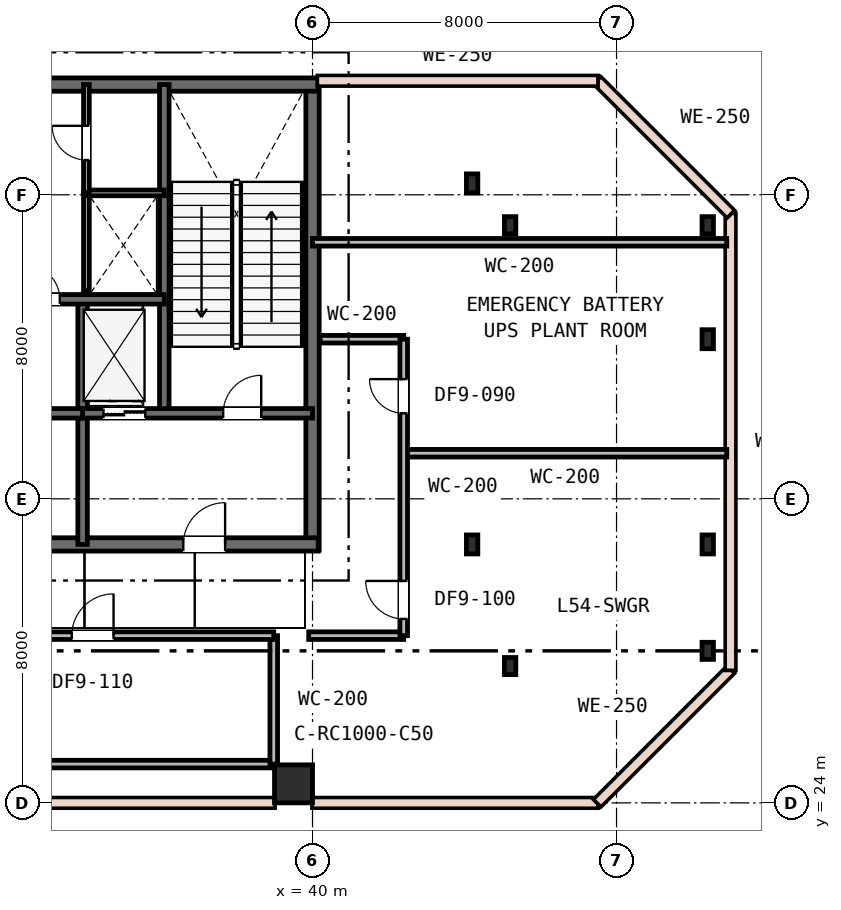
"""IFC4 building model, lengths in metres.
Left out: names, types, materials, properties, quantities, classifications, styles, units other than length and angle.
Written with IfcOpenShell. Run it as: python <this file> out.ifc"""

import sys

from ifc_helpers import new_model, si_unit, direction, frame, frame_2d, origin, origin_2d, place, context, subcontext, project, spatial, rectangle, i_section, extrude, element, fill, save


model = new_model("IFC4")
c1 = context("Model", 3, precision=1e-05, world=origin(), true_north=direction((0.0, 1.0)))
c2 = subcontext(c1, "Body", "Model", "MODEL_VIEW")
j1 = project(units=[si_unit("LENGTHUNIT", "METRE"), si_unit("PLANEANGLEUNIT", "RADIAN")], contexts=[c1])
p1 = place(None, origin())
s1 = spatial("IfcSite", under=j1, at=p1, CompositionType="ELEMENT")
p2 = place(p1, origin())
s2 = spatial("IfcBuilding", under=s1, at=p2, CompositionType="ELEMENT")
p3 = place(p2, frame((0.0, 0.0, 208.2)))
s3 = spatial("IfcBuildingStorey", under=s2, at=p3, CompositionType="ELEMENT", Elevation=208.2)
p4 = place(p3, frame((40.0, 30.65, 0.0), z_axis=(0.0, 0.0, 1.0), x_axis=(0.0, 1.0, 0.0)))
e1 = element("IfcWall", 1, at=p4, inside=s3, PredefinedType="SHEAR", context=c2, shape_type="SweptSolid", body=[
    extrude(rectangle(XDim=12.3, YDim=0.35, at=frame_2d((6.15, 0.0))), origin(), (0.0, 0.0, 1.0), 4.8),
])
p5 = place(p3, frame((15.85, 42.9, 0.0), z_axis=(0.0, 0.0, 1.0), x_axis=(1.0, 0.0, 0.0)))
e2 = element("IfcWall", 2, at=p5, inside=s3, PredefinedType="SHEAR", context=c2, shape_type="SweptSolid", body=[
    extrude(rectangle(XDim=24.3, YDim=0.35, at=frame_2d((12.15, 0.0))), origin(), (0.0, 0.0, 1.0), 4.8),
])
p6 = place(p3, frame((28.95, 30.8, 0.0), z_axis=(0.0, 0.0, 1.0), x_axis=(1.0, 0.0, 0.0)))
e3 = element("IfcWall", 3, at=p6, inside=s3, PredefinedType="SHEAR", context=c2, shape_type="SweptSolid", body=[
    extrude(rectangle(XDim=11.2, YDim=0.35, at=frame_2d((5.6, 0.0))), origin(), (0.0, 0.0, 1.0), 4.8),
])
p7 = place(p6, frame((7.65, 0.0, 0.0)))
e4 = element("IfcOpeningElement", 4, at=p7, cuts=e3, PredefinedType="OPENING", context=c2, shape_type="SweptSolid", body=[
    extrude(rectangle(XDim=1.1, YDim=2.15, at=frame_2d((0.55, 1.075))), frame((0.0, 0.185, 0.0), z_axis=(0.0, -1.0, 0.0), x_axis=(1.0, 0.0, 0.0)), (0.0, 0.0, 1.0), 0.37),
])
p8 = place(p3, frame((36.1, 34.25, 0.0), z_axis=(0.0, 0.0, 1.0), x_axis=(0.0, 1.0, 0.0)))
e5 = element("IfcWall", 5, at=p8, inside=s3, PredefinedType="SHEAR", context=c2, shape_type="SweptSolid", body=[
    extrude(rectangle(XDim=8.65, YDim=0.25, at=frame_2d((4.325, 0.0))), origin(), (0.0, 0.0, 1.0), 4.8),
])
p9 = place(p3, frame((33.95, 30.8, 0.0), z_axis=(0.0, 0.0, 1.0), x_axis=(0.0, 1.0, 0.0)))
e6 = element("IfcWall", 6, at=p9, inside=s3, PredefinedType="SHEAR", context=c2, shape_type="SweptSolid", body=[
    extrude(rectangle(XDim=6.45, YDim=0.25, at=frame_2d((3.225, 0.0))), origin(), (0.0, 0.0, 1.0), 4.8),
])
p10 = place(p3, frame((33.95, 34.25, 0.0), z_axis=(0.0, 0.0, 1.0), x_axis=(1.0, 0.0, 0.0)))
e7 = element("IfcWall", 7, at=p10, inside=s3, PredefinedType="SHEAR", context=c2, shape_type="SweptSolid", body=[
    extrude(rectangle(XDim=6.05, YDim=0.25, at=frame_2d((3.025, 0.0))), origin(), (0.0, 0.0, 1.0), 4.8),
])
p11 = place(p10, frame((3.7, 0.0, 0.0)))
e8 = element("IfcOpeningElement", 8, at=p11, cuts=e7, PredefinedType="OPENING", context=c2, shape_type="SweptSolid", body=[
    extrude(rectangle(XDim=1.0, YDim=2.15, at=frame_2d((0.5, 1.075))), frame((0.0, 0.135, 0.0), z_axis=(0.0, -1.0, 0.0), x_axis=(1.0, 0.0, 0.0)), (0.0, 0.0, 1.0), 0.27),
])
p12 = place(p10, frame((0.55, 0.0, 0.0)))
e9 = element("IfcOpeningElement", 9, at=p12, cuts=e7, PredefinedType="OPENING", context=c2, shape_type="SweptSolid", body=[
    extrude(rectangle(XDim=1.1, YDim=2.15, at=frame_2d((0.55, 1.075))), frame((0.0, 0.135, 0.0), z_axis=(0.0, -1.0, 0.0), x_axis=(1.0, 0.0, 0.0)), (0.0, 0.0, 1.0), 0.27),
])
p13 = place(p3, frame((28.95, 34.25, 0.0), z_axis=(0.0, 0.0, 1.0), x_axis=(1.0, 0.0, 0.0)))
e10 = element("IfcWall", 10, at=p13, inside=s3, PredefinedType="SHEAR", context=c2, shape_type="SweptSolid", body=[
    extrude(rectangle(XDim=5.0, YDim=0.25, at=frame_2d((2.5, 0.0))), origin(), (0.0, 0.0, 1.0), 4.8),
])
p14 = place(p13, frame((1.95, 0.0, 0.0)))
e11 = element("IfcOpeningElement", 11, at=p14, cuts=e10, PredefinedType="OPENING", context=c2, shape_type="SweptSolid", body=[
    extrude(rectangle(XDim=1.0, YDim=2.15, at=frame_2d((0.5, 1.075))), frame((0.0, 0.135, 0.0), z_axis=(0.0, -1.0, 0.0), x_axis=(1.0, 0.0, 0.0)), (0.0, 0.0, 1.0), 0.27),
])
p15 = place(p3, frame((19.9, 37.25, 0.0), z_axis=(0.0, 0.0, 1.0), x_axis=(1.0, 0.0, 0.0)))
e12 = element("IfcWall", 12, at=p15, inside=s3, PredefinedType="SHEAR", context=c2, shape_type="SweptSolid", body=[
    extrude(rectangle(XDim=16.2, YDim=0.25, at=frame_2d((8.1, 0.0))), origin(), (0.0, 0.0, 1.0), 4.8),
])
p16 = place(p15, frame((12.55, 0.0, 0.0)))
e13 = element("IfcOpeningElement", 13, at=p16, cuts=e12, PredefinedType="OPENING", context=c2, shape_type="SweptSolid", body=[
    extrude(rectangle(XDim=0.9, YDim=2.15, at=frame_2d((0.45, 1.075))), frame((0.0, 0.135, 0.0), z_axis=(0.0, -1.0, 0.0), x_axis=(1.0, 0.0, 0.0)), (0.0, 0.0, 1.0), 0.27),
])
p17 = place(p15, frame((2.5, 0.0, 0.0)))
e14 = element("IfcOpeningElement", 14, at=p17, cuts=e12, PredefinedType="OPENING", context=c2, shape_type="SweptSolid", body=[
    extrude(rectangle(XDim=1.05, YDim=2.15, at=frame_2d((0.525, 1.075))), frame((0.0, 0.135, 0.0), z_axis=(0.0, -1.0, 0.0), x_axis=(1.0, 0.0, 0.0)), (0.0, 0.0, 1.0), 0.27),
])
p18 = place(p15, frame((4.4, 0.0, 0.0)))
e15 = element("IfcOpeningElement", 15, at=p18, cuts=e12, PredefinedType="OPENING", context=c2, shape_type="SweptSolid", body=[
    extrude(rectangle(XDim=1.05, YDim=2.15, at=frame_2d((0.525, 1.075))), frame((0.0, 0.135, 0.0), z_axis=(0.0, -1.0, 0.0), x_axis=(1.0, 0.0, 0.0)), (0.0, 0.0, 1.0), 0.27),
])
p19 = place(p15, frame((6.3, 0.0, 0.0)))
e16 = element("IfcOpeningElement", 16, at=p19, cuts=e12, PredefinedType="OPENING", context=c2, shape_type="SweptSolid", body=[
    extrude(rectangle(XDim=1.05, YDim=2.15, at=frame_2d((0.525, 1.075))), frame((0.0, 0.135, 0.0), z_axis=(0.0, -1.0, 0.0), x_axis=(1.0, 0.0, 0.0)), (0.0, 0.0, 1.0), 0.27),
])
p20 = place(p3, frame((39.5, 24.5, 0.0), z_axis=(0.0, 0.0, 1.0), x_axis=(1.0, 0.0, 0.0)))
e17 = element("IfcColumn", 17, at=p20, inside=s3, PredefinedType="COLUMN", context=c2, shape_type="SweptSolid", body=[
    extrude(rectangle(XDim=1.0, YDim=1.0, at=origin_2d()), origin(), (0.0, 0.0, 1.0), 4.8),
])
for number, where, z_axis, x_axis in (
    (18, (45.2, 27.6, 0.0), (0.0, 0.0, 1.0), (1.0, 0.0, 0.0)),
    (19, (45.2, 39.2, 0.0), (0.0, 0.0, 1.0), (1.0, 0.0, 0.0)),
):
    element("IfcColumn", number, at=place(p3, frame(where, z_axis=z_axis, x_axis=x_axis)), inside=s3, PredefinedType="COLUMN", context=c2, shape_type="SweptSolid", body=[
        extrude(i_section(OverallWidth=0.3, OverallDepth=0.45, WebThickness=0.014, FlangeThickness=0.026, FilletRadius=0.027, at=origin_2d()), origin(), (0.0, 0.0, 1.0), 4.8),
    ])
for number, where, z_axis, x_axis in (
    (20, (50.4, 28.0, 0.0), (0.0, 0.0, 1.0), (1.0, 0.0, 0.0)),
    (21, (50.4, 39.2, 0.0), (0.0, 0.0, 1.0), (1.0, 0.0, 0.0)),
):
    element("IfcColumn", number, at=place(p3, frame(where, z_axis=z_axis, x_axis=x_axis)), inside=s3, PredefinedType="COLUMN", context=c2, shape_type="SweptSolid", body=[
        extrude(i_section(OverallWidth=0.3, OverallDepth=0.45, WebThickness=0.014, FlangeThickness=0.026, FilletRadius=0.027, at=origin_2d()), origin(), (0.0, 0.0, 1.0), 4.05),
    ])
for number, where, z_axis, x_axis in (
    (22, (44.2, 30.8, 0.0), (0.0, 0.0, 1.0), (1.0, 0.0, 0.0)),
    (23, (44.2, 40.3, 0.0), (0.0, 0.0, 1.0), (1.0, 0.0, 0.0)),
):
    element("IfcColumn", number, at=place(p3, frame(where, z_axis=z_axis, x_axis=x_axis)), inside=s3, PredefinedType="COLUMN", context=c2, shape_type="SweptSolid", body=[
        extrude(i_section(OverallWidth=0.3, OverallDepth=0.5, WebThickness=0.015, FlangeThickness=0.028, FilletRadius=0.027, at=origin_2d()), origin(), (0.0, 0.0, 1.0), 4.8),
    ])
for number, where, z_axis, x_axis in (
    (24, (50.4, 30.8, 0.0), (0.0, 0.0, 1.0), (1.0, 0.0, 0.0)),
    (25, (50.4, 36.2, 0.0), (0.0, 0.0, 1.0), (1.0, 0.0, 0.0)),
):
    element("IfcColumn", number, at=place(p3, frame(where, z_axis=z_axis, x_axis=x_axis)), inside=s3, PredefinedType="COLUMN", context=c2, shape_type="SweptSolid", body=[
        extrude(i_section(OverallWidth=0.3, OverallDepth=0.5, WebThickness=0.015, FlangeThickness=0.028, FilletRadius=0.027, at=origin_2d()), origin(), (0.0, 0.0, 1.0), 4.05),
    ])
p21 = place(p3, frame((24.5, 24.0, 0.0), z_axis=(0.0, 0.0, 1.0), x_axis=(1.0, 0.0, 0.0)))
e26 = element("IfcWall", 26, at=p21, inside=s3, PredefinedType="STANDARD", context=c2, shape_type="SweptSolid", body=[
    extrude(rectangle(XDim=14.5, YDim=0.25, at=frame_2d((7.25, 0.0))), origin(), (0.0, 0.0, 1.0), 1.15),
])
p22 = place(p3, frame((40.0, 24.0, 0.0), z_axis=(0.0, 0.0, 1.0), x_axis=(1.0, 0.0, 0.0)))
e27 = element("IfcWall", 27, at=p22, inside=s3, PredefinedType="STANDARD", context=c2, shape_type="SweptSolid", body=[
    extrude(rectangle(XDim=7.5, YDim=0.25, at=frame_2d((3.75, 0.0))), origin(), (0.0, 0.0, 1.0), 1.15),
])
p23 = place(p3, frame((47.5, 24.0, 0.0), z_axis=(0.0, 0.0, 1.0), x_axis=(0.707106781187, 0.707106781187, 0.0)))
e28 = element("IfcWall", 28, at=p23, inside=s3, PredefinedType="STANDARD", context=c2, shape_type="SweptSolid", body=[
    extrude(rectangle(XDim=4.95, YDim=0.25, at=frame_2d((2.475, 0.0))), origin(), (0.0, 0.0, 1.0), 1.15),
])
p24 = place(p3, frame((51.0, 27.5, 0.0), z_axis=(0.0, 0.0, 1.0), x_axis=(0.0, 1.0, 0.0)))
e29 = element("IfcWall", 29, at=p24, inside=s3, PredefinedType="STANDARD", context=c2, shape_type="SweptSolid", body=[
    extrude(rectangle(XDim=12.0, YDim=0.25, at=frame_2d((6.0, 0.0))), origin(), (0.0, 0.0, 1.0), 1.15),
])
p25 = place(p3, frame((51.0, 39.5, 0.0), z_axis=(0.0, 0.0, 1.0), x_axis=(-0.707106781187, 0.707106781187, 0.0)))
e30 = element("IfcWall", 30, at=p25, inside=s3, PredefinedType="STANDARD", context=c2, shape_type="SweptSolid", body=[
    extrude(rectangle(XDim=4.95, YDim=0.25, at=frame_2d((2.475, 0.0))), origin(), (0.0, 0.0, 1.0), 1.15),
])
p26 = place(p3, frame((47.5, 43.0, 0.0), z_axis=(0.0, 0.0, 1.0), x_axis=(-1.0, 0.0, 0.0)))
e31 = element("IfcWall", 31, at=p26, inside=s3, PredefinedType="STANDARD", context=c2, shape_type="SweptSolid", body=[
    extrude(rectangle(XDim=7.36, YDim=0.25, at=frame_2d((3.68, 0.0))), origin(), (0.0, 0.0, 1.0), 1.15),
])
p27 = place(p3, frame((34.05, 37.473, 0.0), z_axis=(0.0, 0.0, 1.0), x_axis=(0.0, 1.0, 0.0)))
e32 = element("IfcWall", 32, at=p27, inside=s3, PredefinedType="PLUMBINGWALL", context=c2, shape_type="SweptSolid", body=[
    extrude(rectangle(XDim=2.577, YDim=0.15, at=frame_2d((1.288, 0.0))), origin(), (0.0, 0.0, 1.0), 4.02),
])
p28 = place(p3, frame((34.05, 40.05, 0.0), z_axis=(0.0, 0.0, 1.0), x_axis=(1.0, 0.0, 0.0)))
e33 = element("IfcWall", 33, at=p28, inside=s3, PredefinedType="PARTITIONING", context=c2, shape_type="SweptSolid", body=[
    extrude(rectangle(XDim=2.05, YDim=0.15, at=frame_2d((1.025, 0.0))), origin(), (0.0, 0.0, 1.0), 4.02),
])
p29 = place(p3, frame((34.05, 40.05, 0.0), z_axis=(0.0, 0.0, 1.0), x_axis=(0.0, 1.0, 0.0)))
e34 = element("IfcWall", 34, at=p29, inside=s3, PredefinedType="PARTITIONING", context=c2, shape_type="SweptSolid", body=[
    extrude(rectangle(XDim=2.85, YDim=0.15, at=frame_2d((1.425, 0.0))), origin(), (0.0, 0.0, 1.0), 4.02),
])
p30 = place(p29, frame((0.865, 0.0, 0.0)))
e35 = element("IfcOpeningElement", 35, at=p30, cuts=e34, PredefinedType="OPENING", context=c2, shape_type="SweptSolid", body=[
    extrude(rectangle(XDim=0.9, YDim=2.15, at=frame_2d((0.45, 1.075))), frame((0.0, 0.085, 0.0), z_axis=(0.0, -1.0, 0.0), x_axis=(1.0, 0.0, 0.0)), (0.0, 0.0, 1.0), 0.17),
])
p31 = place(p3, frame((8.4, 25.02, 0.0), z_axis=(0.0, 0.0, 1.0), x_axis=(1.0, 0.0, 0.0)))
e36 = element("IfcWall", 36, at=p31, inside=s3, PredefinedType="PARTITIONING", context=c2, shape_type="SweptSolid", body=[
    extrude(rectangle(XDim=30.6, YDim=0.2, at=frame_2d((15.3, 0.0))), origin(), (0.0, 0.0, 1.0), 3.83),
])
p32 = place(p3, frame((38.98, 25.02, 0.0), z_axis=(0.0, 0.0, 1.0), x_axis=(0.0, 1.0, 0.0)))
e37 = element("IfcWall", 37, at=p32, inside=s3, PredefinedType="PARTITIONING", context=c2, shape_type="SweptSolid", body=[
    extrude(rectangle(XDim=3.38, YDim=0.2, at=frame_2d((1.69, 0.0))), origin(), (0.0, 0.0, 1.0), 3.83),
])
p33 = place(p3, frame((40.0, 38.75, 0.0), z_axis=(0.0, 0.0, 1.0), x_axis=(1.0, 0.0, 0.0)))
e38 = element("IfcWall", 38, at=p33, inside=s3, PredefinedType="PARTITIONING", context=c2, shape_type="SweptSolid", body=[
    extrude(rectangle(XDim=10.9, YDim=0.2, at=frame_2d((5.45, 0.0))), origin(), (0.0, 0.0, 1.0), 3.83),
])
p34 = place(p3, frame((16.52, 28.4, 0.0), z_axis=(0.0, 0.0, 1.0), x_axis=(1.0, 0.0, 0.0)))
e39 = element("IfcWall", 39, at=p34, inside=s3, PredefinedType="PARTITIONING", context=c2, shape_type="SweptSolid", body=[
    extrude(rectangle(XDim=22.46, YDim=0.2, at=frame_2d((11.23, 0.0))), origin(), (0.0, 0.0, 1.0), 3.83),
])
p35 = place(p34, frame((4.615, 0.0, 0.0)))
e40 = element("IfcOpeningElement", 40, at=p35, cuts=e39, PredefinedType="OPENING", context=c2, shape_type="SweptSolid", body=[
    extrude(rectangle(XDim=1.1, YDim=2.15, at=frame_2d((0.55, 1.075))), frame((0.0, 0.11, 0.0), z_axis=(0.0, -1.0, 0.0), x_axis=(1.0, 0.0, 0.0)), (0.0, 0.0, 1.0), 0.22),
])
p36 = place(p34, frame((11.18, 0.0, 0.0)))
e41 = element("IfcOpeningElement", 41, at=p36, cuts=e39, PredefinedType="OPENING", context=c2, shape_type="SweptSolid", body=[
    extrude(rectangle(XDim=0.9, YDim=2.15, at=frame_2d((0.45, 1.075))), frame((0.0, 0.11, 0.0), z_axis=(0.0, -1.0, 0.0), x_axis=(1.0, 0.0, 0.0)), (0.0, 0.0, 1.0), 0.22),
])
p37 = place(p34, frame((17.145, 0.0, 0.0)))
e42 = element("IfcOpeningElement", 42, at=p37, cuts=e39, PredefinedType="OPENING", context=c2, shape_type="SweptSolid", body=[
    extrude(rectangle(XDim=1.1, YDim=2.15, at=frame_2d((0.55, 1.075))), frame((0.0, 0.11, 0.0), z_axis=(0.0, -1.0, 0.0), x_axis=(1.0, 0.0, 0.0)), (0.0, 0.0, 1.0), 0.22),
])
p38 = place(p3, frame((39.9, 28.4, 0.0), z_axis=(0.0, 0.0, 1.0), x_axis=(1.0, 0.0, 0.0)))
e43 = element("IfcWall", 43, at=p38, inside=s3, PredefinedType="PARTITIONING", context=c2, shape_type="SweptSolid", body=[
    extrude(rectangle(XDim=2.5, YDim=0.2, at=frame_2d((1.25, 0.0))), origin(), (0.0, 0.0, 1.0), 3.83),
])
p39 = place(p3, frame((42.4, 33.2, 0.0), z_axis=(0.0, 0.0, 1.0), x_axis=(1.0, 0.0, 0.0)))
e44 = element("IfcWall", 44, at=p39, inside=s3, PredefinedType="PARTITIONING", context=c2, shape_type="SweptSolid", body=[
    extrude(rectangle(XDim=8.5, YDim=0.2, at=frame_2d((4.25, 0.0))), origin(), (0.0, 0.0, 1.0), 3.83),
])
p40 = place(p3, frame((40.2, 36.2, 0.0), z_axis=(0.0, 0.0, 1.0), x_axis=(1.0, 0.0, 0.0)))
e45 = element("IfcWall", 45, at=p40, inside=s3, PredefinedType="PARTITIONING", context=c2, shape_type="SweptSolid", body=[
    extrude(rectangle(XDim=2.2, YDim=0.2, at=frame_2d((1.1, 0.0))), origin(), (0.0, 0.0, 1.0), 4.02),
])
p41 = place(p3, frame((42.4, 28.4, 0.0), z_axis=(0.0, 0.0, 1.0), x_axis=(0.0, 1.0, 0.0)))
e46 = element("IfcWall", 46, at=p41, inside=s3, PredefinedType="PARTITIONING", context=c2, shape_type="SweptSolid", body=[
    extrude(rectangle(XDim=7.8, YDim=0.2, at=frame_2d((3.9, 0.0))), origin(), (0.0, 0.0, 1.0), 3.83),
])
p42 = place(p41, frame((0.44, 0.0, 0.0)))
e47 = element("IfcOpeningElement", 47, at=p42, cuts=e46, PredefinedType="OPENING", context=c2, shape_type="SweptSolid", body=[
    extrude(rectangle(XDim=1.0, YDim=2.15, at=frame_2d((0.5, 1.075))), frame((0.0, 0.11, 0.0), z_axis=(0.0, -1.0, 0.0), x_axis=(1.0, 0.0, 0.0)), (0.0, 0.0, 1.0), 0.22),
])
p43 = place(p41, frame((5.85, 0.0, 0.0)))
e48 = element("IfcOpeningElement", 48, at=p43, cuts=e46, PredefinedType="OPENING", context=c2, shape_type="SweptSolid", body=[
    extrude(rectangle(XDim=0.9, YDim=2.15, at=frame_2d((0.45, 1.075))), frame((0.0, 0.11, 0.0), z_axis=(0.0, -1.0, 0.0), x_axis=(1.0, 0.0, 0.0)), (0.0, 0.0, 1.0), 0.22),
])
p44 = place(p11, origin())
e49 = element("IfcDoor", 49, at=p44, inside=s3, OperationType="SINGLE_SWING_RIGHT", PredefinedType="DOOR", context=c2, shape_type="SweptSolid", body=[
    extrude(rectangle(XDim=1.0, YDim=2.15, at=frame_2d((0.5, 1.075))), frame((0.0, 0.025, 0.0), z_axis=(0.0, -1.0, 0.0), x_axis=(1.0, 0.0, 0.0)), (0.0, 0.0, 1.0), 0.05),
])
fill(e8, e49)
p45 = place(p7, origin())
e50 = element("IfcDoor", 50, at=p45, inside=s3, OperationType="SINGLE_SWING_RIGHT", PredefinedType="DOOR", context=c2, shape_type="SweptSolid", body=[
    extrude(rectangle(XDim=1.1, YDim=2.15, at=frame_2d((0.55, 1.075))), frame((0.0, 0.025, 0.0), z_axis=(0.0, -1.0, 0.0), x_axis=(1.0, 0.0, 0.0)), (0.0, 0.0, 1.0), 0.05),
])
fill(e4, e50)
p46 = place(p16, origin())
e51 = element("IfcDoor", 51, at=p46, inside=s3, OperationType="SINGLE_SWING_LEFT", PredefinedType="DOOR", context=c2, shape_type="SweptSolid", body=[
    extrude(rectangle(XDim=0.9, YDim=2.15, at=frame_2d((0.45, 1.075))), frame((0.0, 0.025, 0.0), z_axis=(0.0, -1.0, 0.0), x_axis=(1.0, 0.0, 0.0)), (0.0, 0.0, 1.0), 0.05),
])
fill(e13, e51)
p47 = place(p30, origin())
e52 = element("IfcDoor", 52, at=p47, inside=s3, OperationType="SINGLE_SWING_RIGHT", PredefinedType="DOOR", context=c2, shape_type="SweptSolid", body=[
    extrude(rectangle(XDim=0.9, YDim=2.15, at=frame_2d((0.45, 1.075))), frame((0.0, 0.025, 0.0), z_axis=(0.0, -1.0, 0.0), x_axis=(1.0, 0.0, 0.0)), (0.0, 0.0, 1.0), 0.05),
])
fill(e35, e52)
p48 = place(p37, origin())
e53 = element("IfcDoor", 53, at=p48, inside=s3, OperationType="SINGLE_SWING_RIGHT", PredefinedType="DOOR", context=c2, shape_type="SweptSolid", body=[
    extrude(rectangle(XDim=1.1, YDim=2.15, at=frame_2d((0.55, 1.075))), frame((0.0, 0.025, 0.0), z_axis=(0.0, -1.0, 0.0), x_axis=(1.0, 0.0, 0.0)), (0.0, 0.0, 1.0), 0.05),
])
fill(e42, e53)
p49 = place(p42, origin())
e54 = element("IfcDoor", 54, at=p49, inside=s3, OperationType="SINGLE_SWING_RIGHT", PredefinedType="DOOR", context=c2, shape_type="SweptSolid", body=[
    extrude(rectangle(XDim=1.0, YDim=2.15, at=frame_2d((0.5, 1.075))), frame((0.0, 0.025, 0.0), z_axis=(0.0, -1.0, 0.0), x_axis=(1.0, 0.0, 0.0)), (0.0, 0.0, 1.0), 0.05),
])
fill(e47, e54)
p50 = place(p43, origin())
e55 = element("IfcDoor", 55, at=p50, inside=s3, OperationType="SINGLE_SWING_RIGHT", PredefinedType="DOOR", context=c2, shape_type="SweptSolid", body=[
    extrude(rectangle(XDim=0.9, YDim=2.15, at=frame_2d((0.45, 1.075))), frame((0.0, 0.025, 0.0), z_axis=(0.0, -1.0, 0.0), x_axis=(1.0, 0.0, 0.0)), (0.0, 0.0, 1.0), 0.05),
])
fill(e48, e55)
p51 = place(p12, origin())
e56 = element("IfcDoor", 56, at=p51, inside=s3, OperationType="DOUBLE_DOOR_SLIDING", PredefinedType="DOOR", context=c2, shape_type="SweptSolid", body=[
    extrude(rectangle(XDim=1.1, YDim=2.15, at=frame_2d((0.55, 1.075))), frame((0.0, 0.025, 0.0), z_axis=(0.0, -1.0, 0.0), x_axis=(1.0, 0.0, 0.0)), (0.0, 0.0, 1.0), 0.05),
])
fill(e9, e56)
save(model, sys.argv[1])
